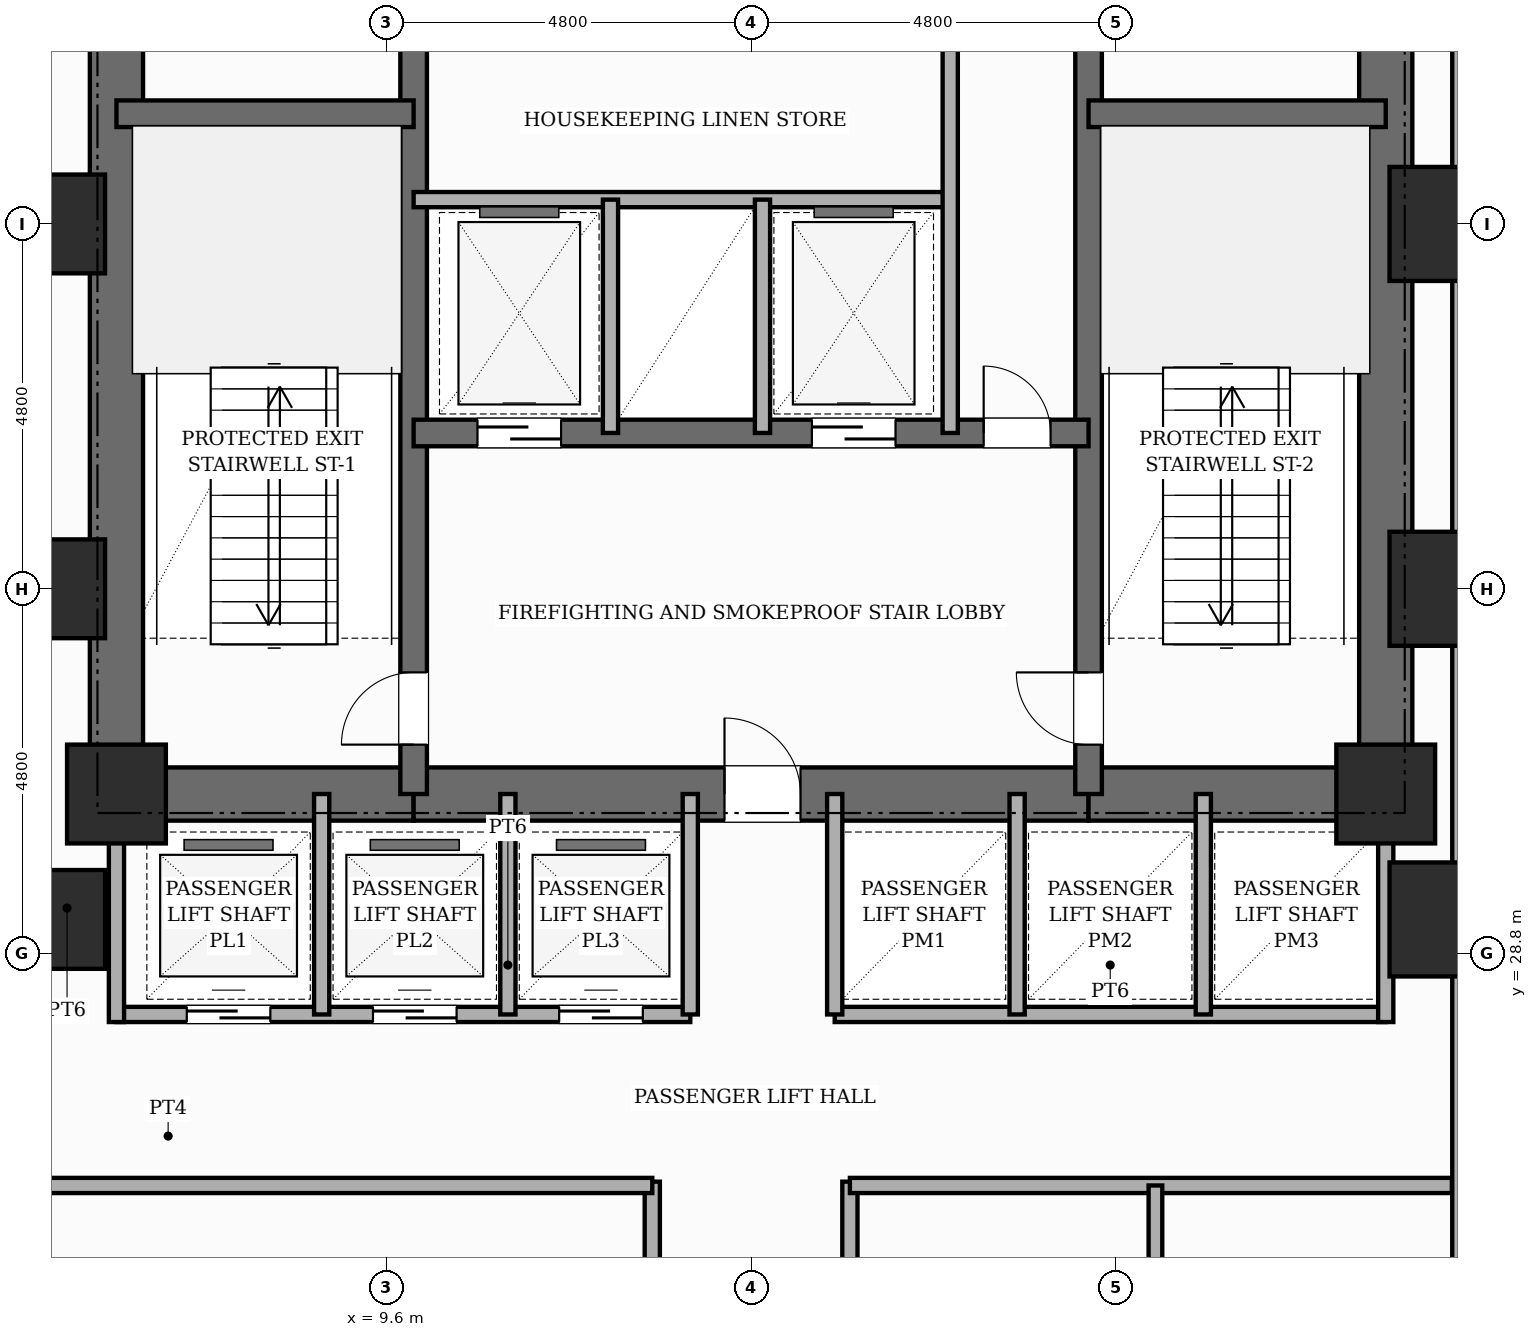
"""IFC4 building model, lengths in metres.
Left out: names, types, materials, properties, quantities, classifications, styles, units other than length and angle.
Written with IfcOpenShell. Run it as: python <this file> out.ifc"""

import sys

from ifc_helpers import new_model, si_unit, direction, frame, frame_2d, origin, origin_2d, place, context, subcontext, project, spatial, rectangle, extrude, element, fill, save


model = new_model("IFC4")
c1 = context("Model", 3, precision=1e-05, world=origin(), true_north=direction((0.0, 1.0)))
c2 = subcontext(c1, "Body", "Model", "MODEL_VIEW")
j1 = project(units=[si_unit("LENGTHUNIT", "METRE"), si_unit("PLANEANGLEUNIT", "RADIAN")], contexts=[c1])
p1 = place(None, origin())
s1 = spatial("IfcSite", under=j1, at=p1, CompositionType="ELEMENT")
p2 = place(p1, origin())
s2 = spatial("IfcBuilding", under=s1, at=p2, CompositionType="ELEMENT")
p3 = place(p2, frame((0.0, 0.0, 10.0)))
s3 = spatial("IfcBuildingStorey", under=s2, at=p3, CompositionType="ELEMENT", Elevation=10.0)
p4 = place(p3, frame((6.05, 30.55, 0.0), z_axis=(0.0, 0.0, 1.0), x_axis=(0.0, 1.0, 0.0)))
e1 = element("IfcWall", 1, at=p4, inside=s3, PredefinedType="SHEAR", context=c2, shape_type="SweptSolid", body=[
    extrude(rectangle(XDim=15.6, YDim=0.7, at=frame_2d((7.8, 0.0))), origin(), (0.0, 0.0, 1.0), 4.8),
])
p5 = place(p3, frame((22.75, 30.55, 0.0), z_axis=(0.0, 0.0, 1.0), x_axis=(0.0, 1.0, 0.0)))
e2 = element("IfcWall", 2, at=p5, inside=s3, PredefinedType="SHEAR", context=c2, shape_type="SweptSolid", body=[
    extrude(rectangle(XDim=15.6, YDim=0.7, at=frame_2d((7.8, 0.0))), origin(), (0.0, 0.0, 1.0), 4.8),
])
p6 = place(p5, frame((10.8, 0.0, 0.0)))
e3 = element("IfcOpeningElement", 3, at=p6, cuts=e2, PredefinedType="OPENING", context=c2, shape_type="SweptSolid", body=[
    extrude(rectangle(XDim=1.0, YDim=2.15, at=frame_2d((0.5, 1.075))), frame((0.0, 0.36, 0.0), z_axis=(0.0, -1.0, 0.0), x_axis=(1.0, 0.0, 0.0)), (0.0, 0.0, 1.0), 0.72),
])
p7 = place(p3, frame((6.05, 30.9, 0.0), z_axis=(0.0, 0.0, 1.0), x_axis=(1.0, 0.0, 0.0)))
e4 = element("IfcWall", 4, at=p7, inside=s3, PredefinedType="SHEAR", context=c2, shape_type="SweptSolid", body=[
    extrude(rectangle(XDim=3.91, YDim=0.7, at=frame_2d((1.955, 0.0))), origin(), (0.0, 0.0, 1.0), 4.8),
])
p8 = place(p3, frame((9.96, 30.9, 0.0), z_axis=(0.0, 0.0, 1.0), x_axis=(1.0, 0.0, 0.0)))
e5 = element("IfcWall", 5, at=p8, inside=s3, PredefinedType="SHEAR", context=c2, shape_type="SweptSolid", body=[
    extrude(rectangle(XDim=8.88, YDim=0.7, at=frame_2d((4.44, 0.0))), origin(), (0.0, 0.0, 1.0), 4.8),
])
p9 = place(p8, frame((4.09, 0.0, 0.0)))
e6 = element("IfcOpeningElement", 6, at=p9, cuts=e5, PredefinedType="OPENING", context=c2, shape_type="SweptSolid", body=[
    extrude(rectangle(XDim=1.0, YDim=2.15, at=frame_2d((0.5, 1.075))), frame((0.0, 0.36, 0.0), z_axis=(0.0, -1.0, 0.0), x_axis=(1.0, 0.0, 0.0)), (0.0, 0.0, 1.0), 0.72),
])
p10 = place(p3, frame((18.84, 30.9, 0.0), z_axis=(0.0, 0.0, 1.0), x_axis=(1.0, 0.0, 0.0)))
e7 = element("IfcWall", 7, at=p10, inside=s3, PredefinedType="SHEAR", context=c2, shape_type="SweptSolid", body=[
    extrude(rectangle(XDim=3.91, YDim=0.7, at=frame_2d((1.955, 0.0))), origin(), (0.0, 0.0, 1.0), 4.8),
])
p11 = place(p3, frame((9.96, 30.9, 0.0), z_axis=(0.0, 0.0, 1.0), x_axis=(0.0, 1.0, 0.0)))
e8 = element("IfcWall", 8, at=p11, inside=s3, PredefinedType="SHEAR", context=c2, shape_type="SweptSolid", body=[
    extrude(rectangle(XDim=14.9, YDim=0.35, at=frame_2d((7.45, 0.0))), origin(), (0.0, 0.0, 1.0), 4.8),
])
p12 = place(p11, frame((0.65, 0.0, 0.0)))
e9 = element("IfcOpeningElement", 9, at=p12, cuts=e8, PredefinedType="OPENING", context=c2, shape_type="SweptSolid", body=[
    extrude(rectangle(XDim=0.95, YDim=2.1, at=frame_2d((0.475, 1.05))), frame((0.0, 0.185, 0.0), z_axis=(0.0, -1.0, 0.0), x_axis=(1.0, 0.0, 0.0)), (0.0, 0.0, 1.0), 0.37),
])
p13 = place(p11, frame((10.45, 0.0, 0.0)))
e10 = element("IfcOpeningElement", 10, at=p13, cuts=e8, PredefinedType="OPENING", context=c2, shape_type="SweptSolid", body=[
    extrude(rectangle(XDim=1.0, YDim=2.15, at=frame_2d((0.5, 1.075))), frame((0.0, 0.185, 0.0), z_axis=(0.0, -1.0, 0.0), x_axis=(1.0, 0.0, 0.0)), (0.0, 0.0, 1.0), 0.37),
])
p14 = place(p3, frame((18.84, 30.9, 0.0), z_axis=(0.0, 0.0, 1.0), x_axis=(0.0, 1.0, 0.0)))
e11 = element("IfcWall", 11, at=p14, inside=s3, PredefinedType="SHEAR", context=c2, shape_type="SweptSolid", body=[
    extrude(rectangle(XDim=14.9, YDim=0.35, at=frame_2d((7.45, 0.0))), origin(), (0.0, 0.0, 1.0), 4.8),
])
p15 = place(p14, frame((0.65, 0.0, 0.0)))
e12 = element("IfcOpeningElement", 12, at=p15, cuts=e11, PredefinedType="OPENING", context=c2, shape_type="SweptSolid", body=[
    extrude(rectangle(XDim=0.95, YDim=2.1, at=frame_2d((0.475, 1.05))), frame((0.0, 0.185, 0.0), z_axis=(0.0, -1.0, 0.0), x_axis=(1.0, 0.0, 0.0)), (0.0, 0.0, 1.0), 0.37),
])
p16 = place(p14, frame((10.45, 0.0, 0.0)))
e13 = element("IfcOpeningElement", 13, at=p16, cuts=e11, PredefinedType="OPENING", context=c2, shape_type="SweptSolid", body=[
    extrude(rectangle(XDim=1.0, YDim=2.15, at=frame_2d((0.5, 1.075))), frame((0.0, 0.185, 0.0), z_axis=(0.0, -1.0, 0.0), x_axis=(1.0, 0.0, 0.0)), (0.0, 0.0, 1.0), 0.37),
])
for number, where, z_axis, x_axis in (
    (14, (6.05, 39.85, 0.0), (0.0, 0.0, 1.0), (1.0, 0.0, 0.0)),
    (15, (18.84, 39.85, 0.0), (0.0, 0.0, 1.0), (1.0, 0.0, 0.0)),
):
    element("IfcWall", number, at=place(p3, frame(where, z_axis=z_axis, x_axis=x_axis)), inside=s3, PredefinedType="SHEAR", context=c2, shape_type="SweptSolid", body=[
        extrude(rectangle(XDim=3.91, YDim=0.35, at=frame_2d((1.955, 0.0))), origin(), (0.0, 0.0, 1.0), 4.8),
    ])
p17 = place(p3, frame((9.96, 35.65, 0.0), z_axis=(0.0, 0.0, 1.0), x_axis=(1.0, 0.0, 0.0)))
e16 = element("IfcWall", 16, at=p17, inside=s3, PredefinedType="SHEAR", context=c2, shape_type="SweptSolid", body=[
    extrude(rectangle(XDim=8.88, YDim=0.35, at=frame_2d((4.44, 0.0))), origin(), (0.0, 0.0, 1.0), 4.8),
])
p18 = place(p17, frame((0.84, 0.0, 0.0)))
e17 = element("IfcOpeningElement", 17, at=p18, cuts=e16, PredefinedType="OPENING", context=c2, shape_type="SweptSolid", body=[
    extrude(rectangle(XDim=1.1, YDim=2.15, at=frame_2d((0.55, 1.075))), frame((0.0, 0.185, 0.0), z_axis=(0.0, -1.0, 0.0), x_axis=(1.0, 0.0, 0.0)), (0.0, 0.0, 1.0), 0.37),
])
p19 = place(p17, frame((5.24, 0.0, 0.0)))
e18 = element("IfcOpeningElement", 18, at=p19, cuts=e16, PredefinedType="OPENING", context=c2, shape_type="SweptSolid", body=[
    extrude(rectangle(XDim=1.1, YDim=2.15, at=frame_2d((0.55, 1.075))), frame((0.0, 0.185, 0.0), z_axis=(0.0, -1.0, 0.0), x_axis=(1.0, 0.0, 0.0)), (0.0, 0.0, 1.0), 0.37),
])
p20 = place(p17, frame((7.5, 0.0, 0.0)))
e19 = element("IfcOpeningElement", 19, at=p20, cuts=e16, PredefinedType="OPENING", context=c2, shape_type="SweptSolid", body=[
    extrude(rectangle(XDim=0.88, YDim=2.1, at=frame_2d((0.44, 1.05))), frame((0.0, 0.185, 0.0), z_axis=(0.0, -1.0, 0.0), x_axis=(1.0, 0.0, 0.0)), (0.0, 0.0, 1.0), 0.37),
])
for number, where, z_axis, x_axis in (
    (20, (5.25, 29.25, 0.0), (0.0, 0.0, 1.0), (1.0, 0.0, 0.0)),
    (21, (5.25, 33.6, 0.0), (0.0, 0.0, 1.0), (1.0, 0.0, 0.0)),
    (22, (5.25, 38.4, 0.0), (0.0, 0.0, 1.0), (1.0, 0.0, 0.0)),
    (23, (6.05, 30.9, 0.0), (0.0, 0.0, 1.0), (1.0, 0.0, 0.0)),
    (24, (22.75, 30.9, 0.0), (0.0, 0.0, 1.0), (1.0, 0.0, 0.0)),
):
    element("IfcColumn", number, at=place(p3, frame(where, z_axis=z_axis, x_axis=x_axis)), inside=s3, PredefinedType="COLUMN", context=c2, shape_type="SweptSolid", body=[
        extrude(rectangle(XDim=1.3, YDim=1.3, at=origin_2d()), origin(), (0.0, 0.0, 1.0), 4.8),
    ])
for number, where, z_axis, x_axis in (
    (25, (23.55, 29.25, 0.0), (0.0, 0.0, 1.0), (1.0, 0.0, 0.0)),
    (26, (23.55, 33.6, 0.0), (0.0, 0.0, 1.0), (1.0, 0.0, 0.0)),
    (27, (23.55, 38.4, 0.0), (0.0, 0.0, 1.0), (1.0, 0.0, 0.0)),
):
    element("IfcColumn", number, at=place(p3, frame(where, z_axis=z_axis, x_axis=x_axis)), inside=s3, PredefinedType="USERDEFINED", context=c2, shape_type="SweptSolid", body=[
        extrude(rectangle(XDim=1.5, YDim=1.5, at=origin_2d()), origin(), (0.0, 0.0, 1.0), 4.8),
    ])
p21 = place(p3, frame((23.825, 48.0, 0.0), z_axis=(0.0, 0.0, 1.0), x_axis=(0.0, -1.0, 0.0)))
e28 = element("IfcWall", 28, at=p21, inside=s3, PredefinedType="SOLIDWALL", context=c2, shape_type="SweptSolid", body=[
    extrude(rectangle(XDim=30.24, YDim=0.4, at=frame_2d((15.12, 0.0))), origin(), (0.0, 0.0, 1.0), 3.48),
])
p22 = place(p21, frame((25.65, 0.0, 0.85)))
e29 = element("IfcOpeningElement", 29, at=p22, cuts=e28, PredefinedType="OPENING", context=c2, shape_type="SweptSolid", body=[
    extrude(rectangle(XDim=1.5, YDim=2.1, at=frame_2d((0.75, 1.05))), frame((0.0, 0.21, 0.0), z_axis=(0.0, -1.0, 0.0), x_axis=(1.0, 0.0, 0.0)), (0.0, 0.0, 1.0), 0.42),
])
p23 = place(p3, frame((9.96, 38.72, 0.0), z_axis=(0.0, 0.0, 1.0), x_axis=(1.0, 0.0, 0.0)))
e30 = element("IfcWall", 30, at=p23, inside=s3, PredefinedType="POLYGONAL", context=c2, shape_type="SweptSolid", body=[
    extrude(rectangle(XDim=7.06, YDim=0.2, at=frame_2d((3.53, 0.0))), origin(), (0.0, 0.0, 1.0), 4.4),
])
for number, where, z_axis, x_axis in (
    (31, (12.55, 35.65, 0.0), (0.0, 0.0, 1.0), (0.0, 1.0, 0.0)),
    (32, (14.55, 35.65, 0.0), (0.0, 0.0, 1.0), (0.0, 1.0, 0.0)),
):
    element("IfcWall", number, at=place(p3, frame(where, z_axis=z_axis, x_axis=x_axis)), inside=s3, PredefinedType="POLYGONAL", context=c2, shape_type="SweptSolid", body=[
        extrude(rectangle(XDim=3.07, YDim=0.2, at=frame_2d((1.535, 0.0))), origin(), (0.0, 0.0, 1.0), 4.4),
    ])
p24 = place(p3, frame((17.02, 35.65, 0.0), z_axis=(0.0, 0.0, 1.0), x_axis=(0.0, 1.0, 0.0)))
e33 = element("IfcWall", 33, at=p24, inside=s3, PredefinedType="POLYGONAL", context=c2, shape_type="SweptSolid", body=[
    extrude(rectangle(XDim=5.15, YDim=0.2, at=frame_2d((2.575, 0.0))), origin(), (0.0, 0.0, 1.0), 4.4),
])
p25 = place(p3, frame((6.05, 28.0, 0.0), z_axis=(0.0, 0.0, 1.0), x_axis=(1.0, 0.0, 0.0)))
e34 = element("IfcWall", 34, at=p25, inside=s3, PredefinedType="POLYGONAL", context=c2, shape_type="SweptSolid", body=[
    extrude(rectangle(XDim=7.55, YDim=0.2, at=frame_2d((3.775, 0.0))), origin(), (0.0, 0.0, 1.0), 4.4),
])
p26 = place(p25, frame((0.925, 0.0, 0.0)))
e35 = element("IfcOpeningElement", 35, at=p26, cuts=e34, PredefinedType="OPENING", context=c2, shape_type="SweptSolid", body=[
    extrude(rectangle(XDim=1.1, YDim=2.15, at=frame_2d((0.55, 1.075))), frame((0.0, 0.11, 0.0), z_axis=(0.0, -1.0, 0.0), x_axis=(1.0, 0.0, 0.0)), (0.0, 0.0, 1.0), 0.22),
])
p27 = place(p25, frame((3.375, 0.0, 0.0)))
e36 = element("IfcOpeningElement", 36, at=p27, cuts=e34, PredefinedType="OPENING", context=c2, shape_type="SweptSolid", body=[
    extrude(rectangle(XDim=1.1, YDim=2.15, at=frame_2d((0.55, 1.075))), frame((0.0, 0.11, 0.0), z_axis=(0.0, -1.0, 0.0), x_axis=(1.0, 0.0, 0.0)), (0.0, 0.0, 1.0), 0.22),
])
p28 = place(p25, frame((5.825, 0.0, 0.0)))
e37 = element("IfcOpeningElement", 37, at=p28, cuts=e34, PredefinedType="OPENING", context=c2, shape_type="SweptSolid", body=[
    extrude(rectangle(XDim=1.1, YDim=2.15, at=frame_2d((0.55, 1.075))), frame((0.0, 0.11, 0.0), z_axis=(0.0, -1.0, 0.0), x_axis=(1.0, 0.0, 0.0)), (0.0, 0.0, 1.0), 0.22),
])
p29 = place(p3, frame((15.5, 28.0, 0.0), z_axis=(0.0, 0.0, 1.0), x_axis=(1.0, 0.0, 0.0)))
e38 = element("IfcWall", 38, at=p29, inside=s3, PredefinedType="POLYGONAL", context=c2, shape_type="SweptSolid", body=[
    extrude(rectangle(XDim=7.25, YDim=0.2, at=frame_2d((3.625, 0.0))), origin(), (0.0, 0.0, 1.0), 4.4),
])
for number, where, z_axis, x_axis in (
    (39, (6.05, 27.9, 0.0), (0.0, 0.0, 1.0), (0.0, 1.0, 0.0)),
    (40, (22.75, 27.9, 0.0), (0.0, 0.0, 1.0), (0.0, 1.0, 0.0)),
):
    element("IfcWall", number, at=place(p3, frame(where, z_axis=z_axis, x_axis=x_axis)), inside=s3, PredefinedType="POLYGONAL", context=c2, shape_type="SweptSolid", body=[
        extrude(rectangle(XDim=3.0, YDim=0.2, at=frame_2d((1.5, 0.0))), origin(), (0.0, 0.0, 1.0), 4.4),
    ])
for number, where, z_axis, x_axis in (
    (41, (13.6, 28.0, 0.0), (0.0, 0.0, 1.0), (0.0, 1.0, 0.0)),
    (42, (15.5, 28.0, 0.0), (0.0, 0.0, 1.0), (0.0, 1.0, 0.0)),
    (43, (8.75, 28.0, 0.0), (0.0, 0.0, 1.0), (0.0, 1.0, 0.0)),
    (44, (11.2, 28.0, 0.0), (0.0, 0.0, 1.0), (0.0, 1.0, 0.0)),
    (45, (17.9, 28.0, 0.0), (0.0, 0.0, 1.0), (0.0, 1.0, 0.0)),
    (46, (20.35, 28.0, 0.0), (0.0, 0.0, 1.0), (0.0, 1.0, 0.0)),
):
    element("IfcWall", number, at=place(p3, frame(where, z_axis=z_axis, x_axis=x_axis)), inside=s3, PredefinedType="POLYGONAL", context=c2, shape_type="SweptSolid", body=[
        extrude(rectangle(XDim=2.9, YDim=0.2, at=frame_2d((1.45, 0.0))), origin(), (0.0, 0.0, 1.0), 4.4),
    ])
p30 = place(p3, frame((13.1, 5.16, 0.0), z_axis=(0.0, 0.0, 1.0), x_axis=(0.0, 1.0, 0.0)))
e47 = element("IfcWall", 47, at=p30, inside=s3, PredefinedType="PARTITIONING", context=c2, shape_type="SweptSolid", body=[
    extrude(rectangle(XDim=20.64, YDim=0.2, at=frame_2d((10.32, 0.0))), origin(), (0.0, 0.0, 1.0), 4.4),
])
p31 = place(p30, frame((5.02, 0.0, 0.0)))
e48 = element("IfcOpeningElement", 48, at=p31, cuts=e47, PredefinedType="OPENING", context=c2, shape_type="SweptSolid", body=[
    extrude(rectangle(XDim=0.98, YDim=2.18, at=frame_2d((0.49, 1.09))), frame((0.0, 0.11, 0.0), z_axis=(0.0, -1.0, 0.0), x_axis=(1.0, 0.0, 0.0)), (0.0, 0.0, 1.0), 0.22),
])
p32 = place(p30, frame((14.62, 0.0, 0.0)))
e49 = element("IfcOpeningElement", 49, at=p32, cuts=e47, PredefinedType="OPENING", context=c2, shape_type="SweptSolid", body=[
    extrude(rectangle(XDim=0.95, YDim=2.15, at=frame_2d((0.475, 1.075))), frame((0.0, 0.11, 0.0), z_axis=(0.0, -1.0, 0.0), x_axis=(1.0, 0.0, 0.0)), (0.0, 0.0, 1.0), 0.22),
])
p33 = place(p3, frame((15.7, 5.16, 0.0), z_axis=(0.0, 0.0, 1.0), x_axis=(0.0, 1.0, 0.0)))
e50 = element("IfcWall", 50, at=p33, inside=s3, PredefinedType="PARTITIONING", context=c2, shape_type="SweptSolid", body=[
    extrude(rectangle(XDim=20.64, YDim=0.2, at=frame_2d((10.32, 0.0))), origin(), (0.0, 0.0, 1.0), 4.4),
])
p34 = place(p33, frame((6.02, 0.0, 0.0)))
e51 = element("IfcOpeningElement", 51, at=p34, cuts=e50, PredefinedType="OPENING", context=c2, shape_type="SweptSolid", body=[
    extrude(rectangle(XDim=0.98, YDim=2.18, at=frame_2d((0.49, 1.09))), frame((0.0, 0.11, 0.0), z_axis=(0.0, -1.0, 0.0), x_axis=(1.0, 0.0, 0.0)), (0.0, 0.0, 1.0), 0.22),
])
p35 = place(p33, frame((15.02, 0.0, 0.0)))
e52 = element("IfcOpeningElement", 52, at=p35, cuts=e50, PredefinedType="OPENING", context=c2, shape_type="SweptSolid", body=[
    extrude(rectangle(XDim=0.86, YDim=2.1, at=frame_2d((0.43, 1.05))), frame((0.0, 0.11, 0.0), z_axis=(0.0, -1.0, 0.0), x_axis=(1.0, 0.0, 0.0)), (0.0, 0.0, 1.0), 0.22),
])
p36 = place(p3, frame((0.36, 25.75, 0.0), z_axis=(0.0, 0.0, 1.0), x_axis=(1.0, 0.0, 0.0)))
e53 = element("IfcWall", 53, at=p36, inside=s3, PredefinedType="PARTITIONING", context=c2, shape_type="SweptSolid", body=[
    extrude(rectangle(XDim=12.74, YDim=0.2, at=frame_2d((6.37, 0.0))), origin(), (0.0, 0.0, 1.0), 4.4),
])
p37 = place(p3, frame((15.7, 25.75, 0.0), z_axis=(0.0, 0.0, 1.0), x_axis=(1.0, 0.0, 0.0)))
e54 = element("IfcWall", 54, at=p37, inside=s3, PredefinedType="PARTITIONING", context=c2, shape_type="SweptSolid", body=[
    extrude(rectangle(XDim=7.92, YDim=0.2, at=frame_2d((3.96, 0.0))), origin(), (0.0, 0.0, 1.0), 4.4),
])
p38 = place(p3, frame((19.72, 18.92, 0.0), z_axis=(0.0, 0.0, 1.0), x_axis=(0.0, 1.0, 0.0)))
e55 = element("IfcWall", 55, at=p38, inside=s3, PredefinedType="PLUMBINGWALL", context=c2, shape_type="SweptSolid", body=[
    extrude(rectangle(XDim=6.83, YDim=0.18, at=frame_2d((3.415, 0.0))), origin(), (0.0, 0.0, 1.0), 4.4),
])
p39 = place(p38, frame((2.2, 0.0, 0.0)))
e56 = element("IfcOpeningElement", 56, at=p39, cuts=e55, PredefinedType="OPENING", context=c2, shape_type="SweptSolid", body=[
    extrude(rectangle(XDim=0.86, YDim=2.1, at=frame_2d((0.43, 1.05))), frame((0.0, 0.1, 0.0), z_axis=(0.0, -1.0, 0.0), x_axis=(1.0, 0.0, 0.0)), (0.0, 0.0, 1.0), 0.2),
])
p40 = place(p12, origin())
e57 = element("IfcDoor", 57, at=p40, inside=s3, OperationType="SINGLE_SWING_LEFT", PredefinedType="DOOR", context=c2, shape_type="SweptSolid", body=[
    extrude(rectangle(XDim=0.95, YDim=2.1, at=frame_2d((0.475, 1.05))), frame((0.0, 0.025, 0.0), z_axis=(0.0, -1.0, 0.0), x_axis=(1.0, 0.0, 0.0)), (0.0, 0.0, 1.0), 0.05),
])
fill(e9, e57)
p41 = place(p15, origin())
e58 = element("IfcDoor", 58, at=p41, inside=s3, OperationType="SINGLE_SWING_RIGHT", PredefinedType="DOOR", context=c2, shape_type="SweptSolid", body=[
    extrude(rectangle(XDim=0.95, YDim=2.1, at=frame_2d((0.475, 1.05))), frame((0.0, 0.025, 0.0), z_axis=(0.0, -1.0, 0.0), x_axis=(1.0, 0.0, 0.0)), (0.0, 0.0, 1.0), 0.05),
])
fill(e12, e58)
p42 = place(p9, origin())
e59 = element("IfcDoor", 59, at=p42, inside=s3, OperationType="SINGLE_SWING_LEFT", PredefinedType="DOOR", context=c2, shape_type="SweptSolid", body=[
    extrude(rectangle(XDim=1.0, YDim=2.15, at=frame_2d((0.5, 1.075))), frame((0.0, 0.025, 0.0), z_axis=(0.0, -1.0, 0.0), x_axis=(1.0, 0.0, 0.0)), (0.0, 0.0, 1.0), 0.05),
])
fill(e6, e59)
p43 = place(p18, origin())
e60 = element("IfcDoor", 60, at=p43, inside=s3, OperationType="SLIDING_TO_LEFT", PredefinedType="DOOR", context=c2, shape_type="SweptSolid", body=[
    extrude(rectangle(XDim=1.1, YDim=2.15, at=frame_2d((0.55, 1.075))), frame((0.0, 0.025, 0.0), z_axis=(0.0, -1.0, 0.0), x_axis=(1.0, 0.0, 0.0)), (0.0, 0.0, 1.0), 0.05),
])
fill(e17, e60)
p44 = place(p19, origin())
e61 = element("IfcDoor", 61, at=p44, inside=s3, OperationType="SLIDING_TO_RIGHT", PredefinedType="DOOR", context=c2, shape_type="SweptSolid", body=[
    extrude(rectangle(XDim=1.1, YDim=2.15, at=frame_2d((0.55, 1.075))), frame((0.0, 0.025, 0.0), z_axis=(0.0, -1.0, 0.0), x_axis=(1.0, 0.0, 0.0)), (0.0, 0.0, 1.0), 0.05),
])
fill(e18, e61)
p45 = place(p20, origin())
e62 = element("IfcDoor", 62, at=p45, inside=s3, OperationType="SINGLE_SWING_LEFT", PredefinedType="DOOR", context=c2, shape_type="SweptSolid", body=[
    extrude(rectangle(XDim=0.88, YDim=2.1, at=frame_2d((0.44, 1.05))), frame((0.0, 0.025, 0.0), z_axis=(0.0, -1.0, 0.0), x_axis=(1.0, 0.0, 0.0)), (0.0, 0.0, 1.0), 0.05),
])
fill(e19, e62)
p46 = place(p26, origin())
e63 = element("IfcDoor", 63, at=p46, inside=s3, OperationType="SLIDING_TO_LEFT", PredefinedType="DOOR", context=c2, shape_type="SweptSolid", body=[
    extrude(rectangle(XDim=1.1, YDim=2.15, at=frame_2d((0.55, 1.075))), frame((0.0, 0.025, 0.0), z_axis=(0.0, -1.0, 0.0), x_axis=(1.0, 0.0, 0.0)), (0.0, 0.0, 1.0), 0.05),
])
fill(e35, e63)
p47 = place(p27, origin())
e64 = element("IfcDoor", 64, at=p47, inside=s3, OperationType="SLIDING_TO_RIGHT", PredefinedType="DOOR", context=c2, shape_type="SweptSolid", body=[
    extrude(rectangle(XDim=1.1, YDim=2.15, at=frame_2d((0.55, 1.075))), frame((0.0, 0.025, 0.0), z_axis=(0.0, -1.0, 0.0), x_axis=(1.0, 0.0, 0.0)), (0.0, 0.0, 1.0), 0.05),
])
fill(e36, e64)
p48 = place(p28, origin())
e65 = element("IfcDoor", 65, at=p48, inside=s3, OperationType="SLIDING_TO_LEFT", PredefinedType="DOOR", context=c2, shape_type="SweptSolid", body=[
    extrude(rectangle(XDim=1.1, YDim=2.15, at=frame_2d((0.55, 1.075))), frame((0.0, 0.025, 0.0), z_axis=(0.0, -1.0, 0.0), x_axis=(1.0, 0.0, 0.0)), (0.0, 0.0, 1.0), 0.05),
])
fill(e37, e65)
save(model, sys.argv[1])
